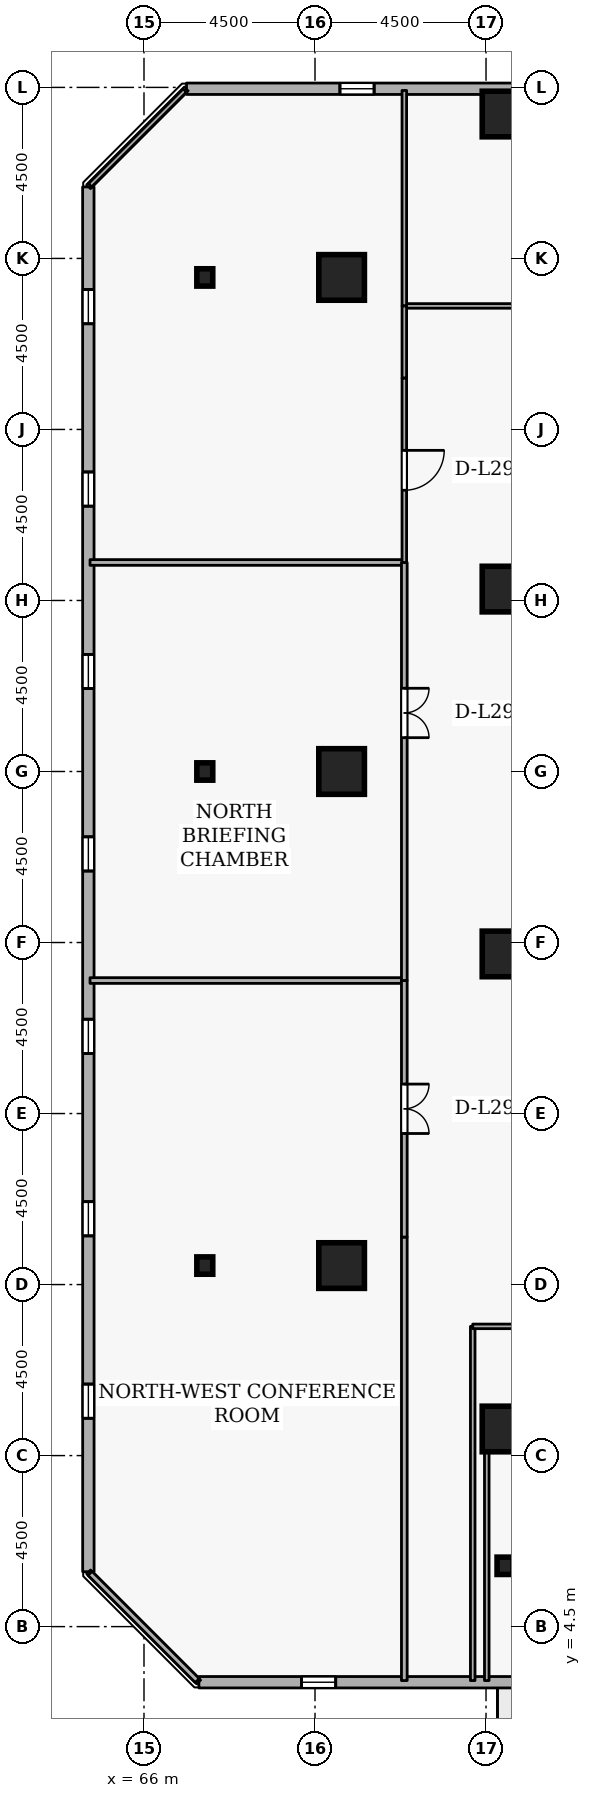
"""IFC4 building model, lengths in metres.
Left out: names, types, materials, properties, quantities, classifications, styles, units other than length and angle.
Written with IfcOpenShell. Run it as: python <this file> out.ifc"""

import sys

from ifc_helpers import new_model, si_unit, direction, frame, frame_2d, origin, origin_2d, place, context, subcontext, project, spatial, rectangle, i_section, extrude, element, fill, save


model = new_model("IFC4")
c1 = context("Model", 3, precision=1e-05, world=origin(), true_north=direction((0.0, 1.0)))
c2 = subcontext(c1, "Body", "Model", "MODEL_VIEW")
j1 = project(units=[si_unit("LENGTHUNIT", "METRE"), si_unit("PLANEANGLEUNIT", "RADIAN")], contexts=[c1])
p1 = place(None, origin())
s1 = spatial("IfcSite", under=j1, at=p1, CompositionType="ELEMENT")
p2 = place(p1, origin())
s2 = spatial("IfcBuilding", under=s1, at=p2, CompositionType="ELEMENT")
p3 = place(p2, frame((0.0, 0.0, 112.5)))
s3 = spatial("IfcBuildingStorey", under=s2, at=p3, CompositionType="ELEMENT", Elevation=112.5)
for number, where, z_axis, x_axis in (
    (1, (75.5, 44.3, 0.0), (0.0, 0.0, 1.0), (1.0, 0.0, 0.0)),
    (2, (71.2, 14.0, 0.0), (0.0, 0.0, 1.0), (1.0, 0.0, 0.0)),
    (3, (71.2, 27.0, 0.0), (0.0, 0.0, 1.0), (1.0, 0.0, 0.0)),
    (4, (71.2, 40.0, 0.0), (0.0, 0.0, 1.0), (1.0, 0.0, 0.0)),
    (5, (75.5, 9.7, 0.0), (0.0, 0.0, 1.0), (1.0, 0.0, 0.0)),
    (6, (75.5, 22.2, 0.0), (0.0, 0.0, 1.0), (1.0, 0.0, 0.0)),
    (7, (75.5, 31.8, 0.0), (0.0, 0.0, 1.0), (1.0, 0.0, 0.0)),
):
    element("IfcColumn", number, at=place(p3, frame(where, z_axis=z_axis, x_axis=x_axis)), inside=s3, PredefinedType="COLUMN", context=c2, shape_type="SweptSolid", body=[
        extrude(rectangle(XDim=1.2, YDim=1.2, at=origin_2d()), origin(), (0.0, 0.0, 1.0), 3.6),
    ])
for number, where, z_axis, x_axis in (
    (8, (67.6, 14.0, 0.0), (0.0, 0.0, 1.0), (1.0, 0.0, 0.0)),
    (9, (67.6, 27.0, 0.0), (0.0, 0.0, 1.0), (1.0, 0.0, 0.0)),
    (10, (67.6, 40.0, 0.0), (0.0, 0.0, 1.0), (1.0, 0.0, 0.0)),
    (11, (75.5, 6.1, 0.0), (0.0, 0.0, 1.0), (1.0, 0.0, 0.0)),
):
    element("IfcColumn", number, at=place(p3, frame(where, z_axis=z_axis, x_axis=x_axis)), inside=s3, PredefinedType="COLUMN", context=c2, shape_type="SweptSolid", body=[
        extrude(i_section(OverallWidth=0.418, OverallDepth=0.456, WebThickness=0.042, FlangeThickness=0.067, FilletRadius=0.015, at=origin_2d()), origin(), (0.0, 0.0, 1.0), 3.6),
    ])
p4 = place(p3, frame((67.445, 3.036, 0.0), z_axis=(0.0, 0.0, 1.0), x_axis=(0.999999999641, -2.6801568e-05, 0.0)))
e12 = element("IfcWall", 12, at=p4, inside=s3, PredefinedType="STANDARD", context=c2, shape_type="SweptSolid", body=[
    extrude(rectangle(XDim=36.437, YDim=0.3, at=frame_2d((18.218, 0.0))), origin(), (0.0, 0.0, 1.0), 2.7),
])
p5 = place(p4, frame((19.118, 0.0, 0.0)))
e13 = element("IfcOpeningElement", 13, at=p5, cuts=e12, PredefinedType="OPENING", context=c2, shape_type="SweptSolid", body=[
    extrude(rectangle(XDim=1.0, YDim=2.08, at=frame_2d((0.5, 1.04))), frame((0.0, 0.16, 0.0), z_axis=(0.0, -1.0, 0.0), x_axis=(1.0, 0.0, 0.0)), (0.0, 0.0, 1.0), 0.32),
])
p6 = place(p4, frame((2.7, 0.0, 0.72)))
e14 = element("IfcOpeningElement", 14, at=p6, cuts=e12, PredefinedType="OPENING", context=c2, shape_type="SweptSolid", body=[
    extrude(rectangle(XDim=0.9, YDim=1.75, at=frame_2d((0.45, 0.875))), frame((0.0, 0.16, 0.0), z_axis=(0.0, -1.0, 0.0), x_axis=(1.0, 0.0, 0.0)), (0.0, 0.0, 1.0), 0.32),
])
p7 = place(p4, frame((12.3, 0.0, 0.72)))
e15 = element("IfcOpeningElement", 15, at=p7, cuts=e12, PredefinedType="OPENING", context=c2, shape_type="SweptSolid", body=[
    extrude(rectangle(XDim=0.9, YDim=1.75, at=frame_2d((0.45, 0.875))), frame((0.0, 0.16, 0.0), z_axis=(0.0, -1.0, 0.0), x_axis=(1.0, 0.0, 0.0)), (0.0, 0.0, 1.0), 0.32),
])
p8 = place(p4, frame((21.9, 0.0, 0.72)))
e16 = element("IfcOpeningElement", 16, at=p8, cuts=e12, PredefinedType="OPENING", context=c2, shape_type="SweptSolid", body=[
    extrude(rectangle(XDim=0.9, YDim=1.75, at=frame_2d((0.45, 0.875))), frame((0.0, 0.16, 0.0), z_axis=(0.0, -1.0, 0.0), x_axis=(1.0, 0.0, 0.0)), (0.0, 0.0, 1.0), 0.32),
])
p9 = place(p4, frame((26.7, 0.0, 0.72)))
e17 = element("IfcOpeningElement", 17, at=p9, cuts=e12, PredefinedType="OPENING", context=c2, shape_type="SweptSolid", body=[
    extrude(rectangle(XDim=0.9, YDim=1.75, at=frame_2d((0.45, 0.875))), frame((0.0, 0.16, 0.0), z_axis=(0.0, -1.0, 0.0), x_axis=(1.0, 0.0, 0.0)), (0.0, 0.0, 1.0), 0.32),
])
p10 = place(p4, frame((31.5, 0.0, 0.72)))
e18 = element("IfcOpeningElement", 18, at=p10, cuts=e12, PredefinedType="OPENING", context=c2, shape_type="SweptSolid", body=[
    extrude(rectangle(XDim=0.9, YDim=1.75, at=frame_2d((0.45, 0.875))), frame((0.0, 0.16, 0.0), z_axis=(0.0, -1.0, 0.0), x_axis=(1.0, 0.0, 0.0)), (0.0, 0.0, 1.0), 0.32),
])
p11 = place(p3, frame((103.555, 44.964, 0.0), z_axis=(0.0, 0.0, 1.0), x_axis=(-0.999999999641, 2.6801568e-05, 0.0)))
e19 = element("IfcWall", 19, at=p11, inside=s3, PredefinedType="STANDARD", context=c2, shape_type="SweptSolid", body=[
    extrude(rectangle(XDim=36.437, YDim=0.3, at=frame_2d((18.218, 0.0))), origin(), (0.0, 0.0, 1.0), 2.7),
])
p12 = place(p11, frame((7.5, 0.0, 0.72)))
e20 = element("IfcOpeningElement", 20, at=p12, cuts=e19, PredefinedType="OPENING", context=c2, shape_type="SweptSolid", body=[
    extrude(rectangle(XDim=0.9, YDim=1.75, at=frame_2d((0.45, 0.875))), frame((0.0, 0.16, 0.0), z_axis=(0.0, -1.0, 0.0), x_axis=(1.0, 0.0, 0.0)), (0.0, 0.0, 1.0), 0.32),
])
p13 = place(p11, frame((12.3, 0.0, 0.72)))
e21 = element("IfcOpeningElement", 21, at=p13, cuts=e19, PredefinedType="OPENING", context=c2, shape_type="SweptSolid", body=[
    extrude(rectangle(XDim=0.9, YDim=1.75, at=frame_2d((0.45, 0.875))), frame((0.0, 0.16, 0.0), z_axis=(0.0, -1.0, 0.0), x_axis=(1.0, 0.0, 0.0)), (0.0, 0.0, 1.0), 0.32),
])
p14 = place(p11, frame((21.9, 0.0, 0.72)))
e22 = element("IfcOpeningElement", 22, at=p14, cuts=e19, PredefinedType="OPENING", context=c2, shape_type="SweptSolid", body=[
    extrude(rectangle(XDim=0.9, YDim=1.75, at=frame_2d((0.45, 0.875))), frame((0.0, 0.16, 0.0), z_axis=(0.0, -1.0, 0.0), x_axis=(1.0, 0.0, 0.0)), (0.0, 0.0, 1.0), 0.32),
])
p15 = place(p11, frame((31.5, 0.0, 0.72)))
e23 = element("IfcOpeningElement", 23, at=p15, cuts=e19, PredefinedType="OPENING", context=c2, shape_type="SweptSolid", body=[
    extrude(rectangle(XDim=0.9, YDim=1.75, at=frame_2d((0.45, 0.875))), frame((0.0, 0.16, 0.0), z_axis=(0.0, -1.0, 0.0), x_axis=(1.0, 0.0, 0.0)), (0.0, 0.0, 1.0), 0.32),
])
p16 = place(p3, frame((64.535, 42.381, 0.0), z_axis=(0.0, 0.0, 1.0), x_axis=(2.6801568e-05, -0.999999999641, 0.0)))
e24 = element("IfcWall", 24, at=p16, inside=s3, PredefinedType="STANDARD", context=c2, shape_type="SweptSolid", body=[
    extrude(rectangle(XDim=36.437, YDim=0.3, at=frame_2d((18.218, 0.0))), origin(), (0.0, 0.0, 1.0), 2.7),
])
p17 = place(p16, frame((2.7, 0.0, 0.72)))
e25 = element("IfcOpeningElement", 25, at=p17, cuts=e24, PredefinedType="OPENING", context=c2, shape_type="SweptSolid", body=[
    extrude(rectangle(XDim=0.9, YDim=1.75, at=frame_2d((0.45, 0.875))), frame((0.0, 0.16, 0.0), z_axis=(0.0, -1.0, 0.0), x_axis=(1.0, 0.0, 0.0)), (0.0, 0.0, 1.0), 0.32),
])
p18 = place(p16, frame((7.5, 0.0, 0.72)))
e26 = element("IfcOpeningElement", 26, at=p18, cuts=e24, PredefinedType="OPENING", context=c2, shape_type="SweptSolid", body=[
    extrude(rectangle(XDim=0.9, YDim=1.75, at=frame_2d((0.45, 0.875))), frame((0.0, 0.16, 0.0), z_axis=(0.0, -1.0, 0.0), x_axis=(1.0, 0.0, 0.0)), (0.0, 0.0, 1.0), 0.32),
])
p19 = place(p16, frame((12.3, 0.0, 0.72)))
e27 = element("IfcOpeningElement", 27, at=p19, cuts=e24, PredefinedType="OPENING", context=c2, shape_type="SweptSolid", body=[
    extrude(rectangle(XDim=0.9, YDim=1.75, at=frame_2d((0.45, 0.875))), frame((0.0, 0.16, 0.0), z_axis=(0.0, -1.0, 0.0), x_axis=(1.0, 0.0, 0.0)), (0.0, 0.0, 1.0), 0.32),
])
p20 = place(p16, frame((17.1, 0.0, 0.72)))
e28 = element("IfcOpeningElement", 28, at=p20, cuts=e24, PredefinedType="OPENING", context=c2, shape_type="SweptSolid", body=[
    extrude(rectangle(XDim=0.9, YDim=1.75, at=frame_2d((0.45, 0.875))), frame((0.0, 0.16, 0.0), z_axis=(0.0, -1.0, 0.0), x_axis=(1.0, 0.0, 0.0)), (0.0, 0.0, 1.0), 0.32),
])
p21 = place(p16, frame((21.9, 0.0, 0.72)))
e29 = element("IfcOpeningElement", 29, at=p21, cuts=e24, PredefinedType="OPENING", context=c2, shape_type="SweptSolid", body=[
    extrude(rectangle(XDim=0.9, YDim=1.75, at=frame_2d((0.45, 0.875))), frame((0.0, 0.16, 0.0), z_axis=(0.0, -1.0, 0.0), x_axis=(1.0, 0.0, 0.0)), (0.0, 0.0, 1.0), 0.32),
])
p22 = place(p16, frame((26.7, 0.0, 0.72)))
e30 = element("IfcOpeningElement", 30, at=p22, cuts=e24, PredefinedType="OPENING", context=c2, shape_type="SweptSolid", body=[
    extrude(rectangle(XDim=0.9, YDim=1.75, at=frame_2d((0.45, 0.875))), frame((0.0, 0.16, 0.0), z_axis=(0.0, -1.0, 0.0), x_axis=(1.0, 0.0, 0.0)), (0.0, 0.0, 1.0), 0.32),
])
p23 = place(p16, frame((31.5, 0.0, 0.72)))
e31 = element("IfcOpeningElement", 31, at=p23, cuts=e24, PredefinedType="OPENING", context=c2, shape_type="SweptSolid", body=[
    extrude(rectangle(XDim=0.9, YDim=1.75, at=frame_2d((0.45, 0.875))), frame((0.0, 0.16, 0.0), z_axis=(0.0, -1.0, 0.0), x_axis=(1.0, 0.0, 0.0)), (0.0, 0.0, 1.0), 0.32),
])
p24 = place(p3, frame((75.02, 9.7, 0.0), z_axis=(0.0, 0.0, 1.0), x_axis=(0.0, -1.0, 0.0)))
e32 = element("IfcWall", 32, at=p24, inside=s3, PredefinedType="PARTITIONING", context=c2, shape_type="SweptSolid", body=[
    extrude(rectangle(XDim=6.62, YDim=0.12, at=frame_2d((3.31, 0.0))), origin(), (0.0, 0.0, 1.0), 3.34),
])
p25 = place(p3, frame((74.65, 3.08, 0.0), z_axis=(0.0, 0.0, 1.0), x_axis=(0.0, 1.0, 0.0)))
e33 = element("IfcWall", 33, at=p25, inside=s3, PredefinedType="PARTITIONING", context=c2, shape_type="SweptSolid", body=[
    extrude(rectangle(XDim=9.32, YDim=0.12, at=frame_2d((4.66, 0.0))), origin(), (0.0, 0.0, 1.0), 3.34),
])
p26 = place(p3, frame((74.65, 12.4, 0.0), z_axis=(0.0, 0.0, 1.0), x_axis=(1.0, 0.0, 0.0)))
e34 = element("IfcWall", 34, at=p26, inside=s3, PredefinedType="PARTITIONING", context=c2, shape_type="SweptSolid", body=[
    extrude(rectangle(XDim=4.802, YDim=0.12, at=frame_2d((2.401, 0.0))), origin(), (0.0, 0.0, 1.0), 3.34),
])
p27 = place(p3, frame((82.2, 39.25, 0.0), z_axis=(0.0, 0.0, 1.0), x_axis=(-1.0, 0.0, 0.0)))
e35 = element("IfcWall", 35, at=p27, inside=s3, PredefinedType="PARTITIONING", context=c2, shape_type="SweptSolid", body=[
    extrude(rectangle(XDim=9.35, YDim=0.12, at=frame_2d((4.675, 0.0))), origin(), (0.0, 0.0, 1.0), 3.34),
])
p28 = place(p27, frame((4.2, 0.0, 0.0)))
e36 = element("IfcOpeningElement", 36, at=p28, cuts=e35, PredefinedType="OPENING", context=c2, shape_type="SweptSolid", body=[
    extrude(rectangle(XDim=0.95, YDim=2.1, at=frame_2d((0.475, 1.05))), frame((0.0, 0.07, 0.0), z_axis=(0.0, -1.0, 0.0), x_axis=(1.0, 0.0, 0.0)), (0.0, 0.0, 1.0), 0.14),
])
p29 = place(p3, frame((72.85, 39.25, 0.0), z_axis=(0.0, 0.0, 1.0), x_axis=(0.0, 1.0, 0.0)))
e37 = element("IfcWall", 37, at=p29, inside=s3, PredefinedType="PARTITIONING", context=c2, shape_type="SweptSolid", body=[
    extrude(rectangle(XDim=5.67, YDim=0.12, at=frame_2d((2.835, 0.0))), origin(), (0.0, 0.0, 1.0), 3.34),
])
p30 = place(p3, frame((72.85, 14.75, 0.0), z_axis=(0.0, 0.0, 1.0), x_axis=(0.0, -1.0, 0.0)))
e38 = element("IfcWall", 38, at=p30, inside=s3, PredefinedType="PARTITIONING", context=c2, shape_type="SweptSolid", body=[
    extrude(rectangle(XDim=11.67, YDim=0.15, at=frame_2d((5.835, 0.0))), origin(), (0.0, 0.0, 1.0), 3.34),
])
p31 = place(p3, frame((67.402, 3.08, 0.0), z_axis=(0.0, 0.0, 1.0), x_axis=(-0.707106781187, 0.707106781187, 0.0)))
e39 = element("IfcWall", 39, at=p31, inside=s3, PredefinedType="PARTITIONING", context=c2, shape_type="SweptSolid", body=[
    extrude(rectangle(XDim=3.99, YDim=0.15, at=frame_2d((1.995, 0.0))), origin(), (0.0, 0.0, 1.0), 3.34),
])
p32 = place(p3, frame((64.58, 21.5, 0.0), z_axis=(0.0, 0.0, 1.0), x_axis=(1.0, 0.0, 0.0)))
e40 = element("IfcWall", 40, at=p32, inside=s3, PredefinedType="PARTITIONING", context=c2, shape_type="SweptSolid", body=[
    extrude(rectangle(XDim=8.27, YDim=0.15, at=frame_2d((4.135, 0.0))), origin(), (0.0, 0.0, 1.0), 3.34),
])
p33 = place(p3, frame((72.85, 21.5, 0.0), z_axis=(0.0, 0.0, 1.0), x_axis=(0.0, -1.0, 0.0)))
e41 = element("IfcWall", 41, at=p33, inside=s3, PredefinedType="PARTITIONING", context=c2, shape_type="SweptSolid", body=[
    extrude(rectangle(XDim=6.75, YDim=0.15, at=frame_2d((3.375, 0.0))), origin(), (0.0, 0.0, 1.0), 3.34),
])
p34 = place(p33, frame((2.725, 0.0, 0.0)))
e42 = element("IfcOpeningElement", 42, at=p34, cuts=e41, PredefinedType="OPENING", context=c2, shape_type="SweptSolid", body=[
    extrude(rectangle(XDim=1.3, YDim=2.12, at=frame_2d((0.65, 1.06))), frame((0.0, 0.085, 0.0), z_axis=(0.0, -1.0, 0.0), x_axis=(1.0, 0.0, 0.0)), (0.0, 0.0, 1.0), 0.17),
])
p35 = place(p3, frame((64.58, 32.5, 0.0), z_axis=(0.0, 0.0, 1.0), x_axis=(1.0, 0.0, 0.0)))
e43 = element("IfcWall", 43, at=p35, inside=s3, PredefinedType="PARTITIONING", context=c2, shape_type="SweptSolid", body=[
    extrude(rectangle(XDim=8.27, YDim=0.15, at=frame_2d((4.135, 0.0))), origin(), (0.0, 0.0, 1.0), 3.34),
])
p36 = place(p3, frame((72.85, 32.5, 0.0), z_axis=(0.0, 0.0, 1.0), x_axis=(0.0, -1.0, 0.0)))
e44 = element("IfcWall", 44, at=p36, inside=s3, PredefinedType="PARTITIONING", context=c2, shape_type="SweptSolid", body=[
    extrude(rectangle(XDim=11.0, YDim=0.15, at=frame_2d((5.5, 0.0))), origin(), (0.0, 0.0, 1.0), 3.34),
])
p37 = place(p36, frame((3.31, 0.0, 0.0)))
e45 = element("IfcOpeningElement", 45, at=p37, cuts=e44, PredefinedType="OPENING", context=c2, shape_type="SweptSolid", body=[
    extrude(rectangle(XDim=1.3, YDim=2.12, at=frame_2d((0.65, 1.06))), frame((0.0, 0.085, 0.0), z_axis=(0.0, -1.0, 0.0), x_axis=(1.0, 0.0, 0.0)), (0.0, 0.0, 1.0), 0.17),
])
p38 = place(p3, frame((64.58, 42.425, 0.0), z_axis=(0.0, 0.0, 1.0), x_axis=(0.707106781187, 0.707106781187, 0.0)))
e46 = element("IfcWall", 46, at=p38, inside=s3, PredefinedType="PARTITIONING", context=c2, shape_type="SweptSolid", body=[
    extrude(rectangle(XDim=3.528, YDim=0.12, at=frame_2d((1.764, 0.0))), origin(), (0.0, 0.0, 1.0), 3.34),
])
p39 = place(p3, frame((72.85, 39.25, 0.0), z_axis=(0.0, 0.0, 1.0), x_axis=(0.0, -1.0, 0.0)))
e47 = element("IfcWall", 47, at=p39, inside=s3, PredefinedType="PARTITIONING", context=c2, shape_type="SweptSolid", body=[
    extrude(rectangle(XDim=1.9, YDim=0.12, at=frame_2d((0.95, 0.0))), origin(), (0.0, 0.0, 1.0), 3.34),
])
p40 = place(p3, frame((72.85, 37.35, 0.0), z_axis=(0.0, 0.0, 1.0), x_axis=(0.0, -1.0, 0.0)))
e48 = element("IfcWall", 48, at=p40, inside=s3, PredefinedType="PARTITIONING", context=c2, shape_type="SweptSolid", body=[
    extrude(rectangle(XDim=4.85, YDim=0.12, at=frame_2d((2.425, 0.0))), origin(), (0.0, 0.0, 1.0), 2.895),
])
p41 = place(p40, frame((1.9, 0.0, 0.0)))
e49 = element("IfcOpeningElement", 49, at=p41, cuts=e48, PredefinedType="OPENING", context=c2, shape_type="SweptSolid", body=[
    extrude(rectangle(XDim=1.05, YDim=2.1, at=frame_2d((0.525, 1.05))), frame((0.0, 0.07, 0.0), z_axis=(0.0, -1.0, 0.0), x_axis=(1.0, 0.0, 0.0)), (0.0, 0.0, 1.0), 0.14),
])
p42 = place(p6, origin())
e50 = element("IfcWindow", 50, at=p42, inside=s3, PartitioningType="SINGLE_PANEL", PredefinedType="WINDOW", context=c2, shape_type="SweptSolid", body=[
    extrude(rectangle(XDim=0.9, YDim=1.75, at=frame_2d((0.45, 0.875))), frame((0.0, 0.03, 0.0), z_axis=(0.0, -1.0, 0.0), x_axis=(1.0, 0.0, 0.0)), (0.0, 0.0, 1.0), 0.06),
])
fill(e14, e50)
p43 = place(p15, origin())
e51 = element("IfcWindow", 51, at=p43, inside=s3, PartitioningType="SINGLE_PANEL", PredefinedType="WINDOW", context=c2, shape_type="SweptSolid", body=[
    extrude(rectangle(XDim=0.9, YDim=1.75, at=frame_2d((0.45, 0.875))), frame((0.0, 0.03, 0.0), z_axis=(0.0, -1.0, 0.0), x_axis=(1.0, 0.0, 0.0)), (0.0, 0.0, 1.0), 0.06),
])
fill(e23, e51)
p44 = place(p17, origin())
e52 = element("IfcWindow", 52, at=p44, inside=s3, PartitioningType="SINGLE_PANEL", PredefinedType="WINDOW", context=c2, shape_type="SweptSolid", body=[
    extrude(rectangle(XDim=0.9, YDim=1.75, at=frame_2d((0.45, 0.875))), frame((0.0, 0.03, 0.0), z_axis=(0.0, -1.0, 0.0), x_axis=(1.0, 0.0, 0.0)), (0.0, 0.0, 1.0), 0.06),
])
fill(e25, e52)
p45 = place(p18, origin())
e53 = element("IfcWindow", 53, at=p45, inside=s3, PartitioningType="SINGLE_PANEL", PredefinedType="WINDOW", context=c2, shape_type="SweptSolid", body=[
    extrude(rectangle(XDim=0.9, YDim=1.75, at=frame_2d((0.45, 0.875))), frame((0.0, 0.03, 0.0), z_axis=(0.0, -1.0, 0.0), x_axis=(1.0, 0.0, 0.0)), (0.0, 0.0, 1.0), 0.06),
])
fill(e26, e53)
p46 = place(p19, origin())
e54 = element("IfcWindow", 54, at=p46, inside=s3, PartitioningType="SINGLE_PANEL", PredefinedType="WINDOW", context=c2, shape_type="SweptSolid", body=[
    extrude(rectangle(XDim=0.9, YDim=1.75, at=frame_2d((0.45, 0.875))), frame((0.0, 0.03, 0.0), z_axis=(0.0, -1.0, 0.0), x_axis=(1.0, 0.0, 0.0)), (0.0, 0.0, 1.0), 0.06),
])
fill(e27, e54)
p47 = place(p20, origin())
e55 = element("IfcWindow", 55, at=p47, inside=s3, PartitioningType="SINGLE_PANEL", PredefinedType="WINDOW", context=c2, shape_type="SweptSolid", body=[
    extrude(rectangle(XDim=0.9, YDim=1.75, at=frame_2d((0.45, 0.875))), frame((0.0, 0.03, 0.0), z_axis=(0.0, -1.0, 0.0), x_axis=(1.0, 0.0, 0.0)), (0.0, 0.0, 1.0), 0.06),
])
fill(e28, e55)
p48 = place(p21, origin())
e56 = element("IfcWindow", 56, at=p48, inside=s3, PartitioningType="SINGLE_PANEL", PredefinedType="WINDOW", context=c2, shape_type="SweptSolid", body=[
    extrude(rectangle(XDim=0.9, YDim=1.75, at=frame_2d((0.45, 0.875))), frame((0.0, 0.03, 0.0), z_axis=(0.0, -1.0, 0.0), x_axis=(1.0, 0.0, 0.0)), (0.0, 0.0, 1.0), 0.06),
])
fill(e29, e56)
p49 = place(p22, origin())
e57 = element("IfcWindow", 57, at=p49, inside=s3, PartitioningType="SINGLE_PANEL", PredefinedType="WINDOW", context=c2, shape_type="SweptSolid", body=[
    extrude(rectangle(XDim=0.9, YDim=1.75, at=frame_2d((0.45, 0.875))), frame((0.0, 0.03, 0.0), z_axis=(0.0, -1.0, 0.0), x_axis=(1.0, 0.0, 0.0)), (0.0, 0.0, 1.0), 0.06),
])
fill(e30, e57)
p50 = place(p23, origin())
e58 = element("IfcWindow", 58, at=p50, inside=s3, PartitioningType="SINGLE_PANEL", PredefinedType="WINDOW", context=c2, shape_type="SweptSolid", body=[
    extrude(rectangle(XDim=0.9, YDim=1.75, at=frame_2d((0.45, 0.875))), frame((0.0, 0.03, 0.0), z_axis=(0.0, -1.0, 0.0), x_axis=(1.0, 0.0, 0.0)), (0.0, 0.0, 1.0), 0.06),
])
fill(e31, e58)
p51 = place(p34, origin())
e59 = element("IfcDoor", 59, at=p51, inside=s3, OperationType="DOUBLE_DOOR_SINGLE_SWING", PredefinedType="DOOR", context=c2, shape_type="SweptSolid", body=[
    extrude(rectangle(XDim=1.3, YDim=2.12, at=frame_2d((0.65, 1.06))), frame((0.0, 0.025, 0.0), z_axis=(0.0, -1.0, 0.0), x_axis=(1.0, 0.0, 0.0)), (0.0, 0.0, 1.0), 0.05),
])
fill(e42, e59)
p52 = place(p37, origin())
e60 = element("IfcDoor", 60, at=p52, inside=s3, OperationType="DOUBLE_DOOR_SINGLE_SWING", PredefinedType="DOOR", context=c2, shape_type="SweptSolid", body=[
    extrude(rectangle(XDim=1.3, YDim=2.12, at=frame_2d((0.65, 1.06))), frame((0.0, 0.025, 0.0), z_axis=(0.0, -1.0, 0.0), x_axis=(1.0, 0.0, 0.0)), (0.0, 0.0, 1.0), 0.05),
])
fill(e45, e60)
p53 = place(p41, origin())
e61 = element("IfcDoor", 61, at=p53, inside=s3, OperationType="SINGLE_SWING_LEFT", PredefinedType="DOOR", context=c2, shape_type="SweptSolid", body=[
    extrude(rectangle(XDim=1.05, YDim=2.1, at=frame_2d((0.525, 1.05))), frame((0.0, 0.025, 0.0), z_axis=(0.0, -1.0, 0.0), x_axis=(1.0, 0.0, 0.0)), (0.0, 0.0, 1.0), 0.05),
])
fill(e49, e61)
save(model, sys.argv[1])
